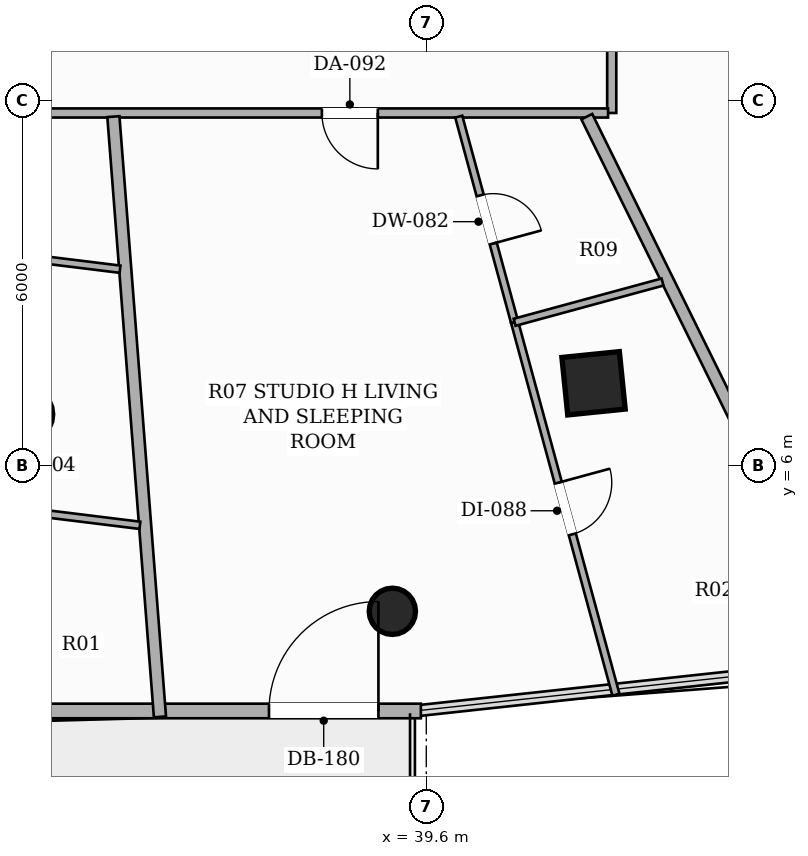
"""IFC4 building model, lengths in metres.
Left out: names, types, materials, properties, quantities, classifications, styles, units other than length and angle.
Written with IfcOpenShell. Run it as: python <this file> out.ifc"""

import sys

from ifc_helpers import new_model, si_unit, direction, frame, frame_2d, origin, origin_2d, place, context, subcontext, project, spatial, rectangle, hollow_rectangle, hollow_circle, extrude, element, fill, save


model = new_model("IFC4")
c1 = context("Model", 3, precision=1e-05, world=origin(), true_north=direction((0.0, 1.0)))
c2 = subcontext(c1, "Body", "Model", "MODEL_VIEW")
j1 = project(units=[si_unit("LENGTHUNIT", "METRE"), si_unit("PLANEANGLEUNIT", "RADIAN")], contexts=[c1])
p1 = place(None, origin())
s1 = spatial("IfcSite", under=j1, at=p1, CompositionType="ELEMENT")
p2 = place(p1, origin())
s2 = spatial("IfcBuilding", under=s1, at=p2, CompositionType="ELEMENT")
p3 = place(p2, frame((0.0, 0.0, 67.55)))
s3 = spatial("IfcBuildingStorey", under=s2, at=p3, CompositionType="ELEMENT", Elevation=67.55)
p4 = place(p3, frame((33.0, 6.844, 0.0), z_axis=(0.0, 0.0, 1.0), x_axis=(1.0, 0.0, 0.0)))
e1 = element("IfcColumn", 1, at=p4, inside=s3, PredefinedType="COLUMN", context=c2, shape_type="SweptSolid", body=[
    extrude(hollow_circle(Radius=0.457, WallThickness=0.025, at=origin_2d()), origin(), (0.0, 0.0, 1.0), 3.3),
])
p5 = place(p3, frame((42.351, 7.355, 0.0), z_axis=(0.0, 0.0, 1.0), x_axis=(0.994880708829, 0.101056297183, 0.0)))
e2 = element("IfcColumn", 2, at=p5, inside=s3, PredefinedType="COLUMN", context=c2, shape_type="SweptSolid", body=[
    extrude(hollow_rectangle(XDim=0.95, YDim=0.95, WallThickness=0.032, at=origin_2d()), origin(), (0.0, 0.0, 1.0), 3.3),
])
p6 = place(p3, frame((39.042, 3.605, 0.0), z_axis=(0.0, 0.0, 1.0), x_axis=(1.0, 0.0, 0.0)))
e3 = element("IfcColumn", 3, at=p6, inside=s3, PredefinedType="COLUMN", context=c2, shape_type="SweptSolid", body=[
    extrude(hollow_circle(Radius=0.381, WallThickness=0.022, at=origin_2d()), origin(), (0.0, 0.0, 1.0), 3.3),
])
p7 = place(p3, frame((26.489, 1.966, 0.0), z_axis=(0.0, 0.0, 1.0), x_axis=(1.0, 0.0, 0.0)))
e4 = element("IfcWall", 4, at=p7, inside=s3, PredefinedType="SOLIDWALL", context=c2, shape_type="SweptSolid", body=[
    extrude(rectangle(XDim=13.022, YDim=0.24, at=frame_2d((6.511, 0.0))), origin(), (0.0, 0.0, 1.0), 2.624),
])
p8 = place(p7, frame((10.524, 0.0, 0.0)))
e5 = element("IfcOpeningElement", 5, at=p8, cuts=e4, PredefinedType="OPENING", context=c2, shape_type="SweptSolid", body=[
    extrude(rectangle(XDim=1.8, YDim=2.2, at=frame_2d((0.9, 1.1))), frame((0.0, 0.13, 0.0), z_axis=(0.0, -1.0, 0.0), x_axis=(1.0, 0.0, 0.0)), (0.0, 0.0, 1.0), 0.26),
])
p9 = place(p3, frame((42.65, 36.84, 0.0), z_axis=(0.0, 0.0, 1.0), x_axis=(0.0, -1.0, 0.0)))
e6 = element("IfcWall", 6, at=p9, inside=s3, PredefinedType="PARTITIONING", context=c2, shape_type="SweptSolid", body=[
    extrude(rectangle(XDim=25.04, YDim=0.15, at=frame_2d((12.52, 0.0))), origin(), (0.0, 0.0, 1.0), 2.413),
])
p10 = place(p9, frame((6.577, 0.0, 0.0)))
e7 = element("IfcOpeningElement", 7, at=p10, cuts=e6, PredefinedType="OPENING", context=c2, shape_type="SweptSolid", body=[
    extrude(rectangle(XDim=0.92, YDim=2.15, at=frame_2d((0.46, 1.075))), frame((0.0, 0.085, 0.0), z_axis=(0.0, -1.0, 0.0), x_axis=(1.0, 0.0, 0.0)), (0.0, 0.0, 1.0), 0.17),
])
p11 = place(p9, frame((19.777, 0.0, 0.0)))
e8 = element("IfcOpeningElement", 8, at=p11, cuts=e6, PredefinedType="OPENING", context=c2, shape_type="SweptSolid", body=[
    extrude(rectangle(XDim=0.88, YDim=2.1, at=frame_2d((0.44, 1.05))), frame((0.0, 0.085, 0.0), z_axis=(0.0, -1.0, 0.0), x_axis=(1.0, 0.0, 0.0)), (0.0, 0.0, 1.0), 0.17),
])
p12 = place(p9, frame((14.193, 0.0, 0.0)))
e9 = element("IfcOpeningElement", 9, at=p12, cuts=e6, PredefinedType="OPENING", context=c2, shape_type="SweptSolid", body=[
    extrude(rectangle(XDim=0.88, YDim=2.1, at=frame_2d((0.44, 1.05))), frame((0.0, 0.085, 0.0), z_axis=(0.0, -1.0, 0.0), x_axis=(1.0, 0.0, 0.0)), (0.0, 0.0, 1.0), 0.17),
])
p13 = place(p3, frame((42.59, 11.8, 0.0), z_axis=(0.0, 0.0, 1.0), x_axis=(-1.0, 0.0, 0.0)))
e10 = element("IfcWall", 10, at=p13, inside=s3, PredefinedType="PARTITIONING", context=c2, shape_type="SweptSolid", body=[
    extrude(rectangle(XDim=19.24, YDim=0.15, at=frame_2d((9.62, 0.0))), origin(), (0.0, 0.0, 1.0), 2.669),
])
p14 = place(p13, frame((11.489, 0.0, 0.0)))
e11 = element("IfcOpeningElement", 11, at=p14, cuts=e10, PredefinedType="OPENING", context=c2, shape_type="SweptSolid", body=[
    extrude(rectangle(XDim=0.92, YDim=2.15, at=frame_2d((0.46, 1.075))), frame((0.0, 0.085, 0.0), z_axis=(0.0, -1.0, 0.0), x_axis=(1.0, 0.0, 0.0)), (0.0, 0.0, 1.0), 0.17),
])
p15 = place(p13, frame((3.787, 0.0, 0.0)))
e12 = element("IfcOpeningElement", 12, at=p15, cuts=e10, PredefinedType="OPENING", context=c2, shape_type="SweptSolid", body=[
    extrude(rectangle(XDim=0.92, YDim=2.15, at=frame_2d((0.46, 1.075))), frame((0.0, 0.085, 0.0), z_axis=(0.0, -1.0, 0.0), x_axis=(1.0, 0.0, 0.0)), (0.0, 0.0, 1.0), 0.17),
])
p16 = place(p3, frame((58.866, 12.141, 0.0), z_axis=(0.0, 0.0, 1.0), x_axis=(-0.815477500133, 0.578788775614, 0.0)))
e13 = element("IfcWall", 13, at=p16, inside=s3, PredefinedType="PARTITIONING", context=c2, shape_type="SweptSolid", body=[
    extrude(rectangle(XDim=19.812, YDim=0.2, at=frame_2d((9.906, 0.0))), origin(), (0.0, 0.0, 1.0), 2.413),
])
p17 = place(p3, frame((46.754, 2.576, 0.0), z_axis=(0.0, 0.0, 1.0), x_axis=(-0.441871352221, 0.897078429172, 0.0)))
e14 = element("IfcWall", 14, at=p17, inside=s3, PredefinedType="PARTITIONING", context=c2, shape_type="SweptSolid", body=[
    extrude(rectangle(XDim=10.215, YDim=0.2, at=frame_2d((5.108, 0.0))), origin(), (0.0, 0.0, 1.0), 2.413),
])
p18 = place(p3, frame((42.71, 21.087, 0.0), z_axis=(0.0, 0.0, 1.0), x_axis=(0.717996025824, -0.696047201633, 0.0)))
e15 = element("IfcWall", 15, at=p18, inside=s3, PredefinedType="PARTITIONING", context=c2, shape_type="SweptSolid", body=[
    extrude(rectangle(XDim=23.737, YDim=0.2, at=frame_2d((11.868, 0.0))), origin(), (0.0, 0.0, 1.0), 2.413),
])
p19 = place(p3, frame((34.454, 11.74, 0.0), z_axis=(0.0, 0.0, 1.0), x_axis=(0.077354581403, -0.997003645297, 0.0)))
e16 = element("IfcWall", 16, at=p19, inside=s3, PredefinedType="PARTITIONING", context=c2, shape_type="SweptSolid", body=[
    extrude(rectangle(XDim=9.901, YDim=0.2, at=frame_2d((4.95, 0.0))), origin(), (0.0, 0.0, 1.0), 2.413),
])
p20 = place(p3, frame((34.563, 9.231, 0.0), z_axis=(0.0, 0.0, 1.0), x_axis=(-0.992492062854, 0.122309055968, 0.0)))
e17 = element("IfcWall", 17, at=p20, inside=s3, PredefinedType="PARTITIONING", context=c2, shape_type="SweptSolid", body=[
    extrude(rectangle(XDim=2.02, YDim=0.12, at=frame_2d((1.01, 0.0))), origin(), (0.0, 0.0, 1.0), 2.669),
])
p21 = place(p3, frame((34.89, 5.019, 0.0), z_axis=(0.0, 0.0, 1.0), x_axis=(-0.992491734807, 0.12231171792, 0.0)))
e18 = element("IfcWall", 18, at=p21, inside=s3, PredefinedType="PARTITIONING", context=c2, shape_type="SweptSolid", body=[
    extrude(rectangle(XDim=2.86, YDim=0.12, at=frame_2d((1.43, 0.0))), origin(), (0.0, 0.0, 1.0), 3.06),
])
p22 = place(p3, frame((40.134, 11.74, 0.0), z_axis=(0.0, 0.0, 1.0), x_axis=(0.262203658207, -0.965012560345, 0.0)))
e19 = element("IfcWall", 19, at=p22, inside=s3, PredefinedType="PARTITIONING", context=c2, shape_type="SweptSolid", body=[
    extrude(rectangle(XDim=3.505, YDim=0.12, at=frame_2d((1.752, 0.0))), origin(), (0.0, 0.0, 1.0), 3.06),
])
p23 = place(p22, frame((1.342, 0.0, 0.0)))
e20 = element("IfcOpeningElement", 20, at=p23, cuts=e19, PredefinedType="OPENING", context=c2, shape_type="SweptSolid", body=[
    extrude(rectangle(XDim=0.82, YDim=2.1, at=frame_2d((0.41, 1.05))), frame((0.0, 0.07, 0.0), z_axis=(0.0, -1.0, 0.0), x_axis=(1.0, 0.0, 0.0)), (0.0, 0.0, 1.0), 0.14),
])
p24 = place(p3, frame((41.053, 8.358, 0.0), z_axis=(0.0, 0.0, 1.0), x_axis=(0.262466446164, -0.964941119778, 0.0)))
e21 = element("IfcWall", 21, at=p24, inside=s3, PredefinedType="PARTITIONING", context=c2, shape_type="SweptSolid", body=[
    extrude(rectangle(XDim=6.348, YDim=0.12, at=frame_2d((3.174, 0.0))), origin(), (0.0, 0.0, 1.0), 2.413),
])
p25 = place(p24, frame((2.734, 0.0, 0.0)))
e22 = element("IfcOpeningElement", 22, at=p25, cuts=e21, PredefinedType="OPENING", context=c2, shape_type="SweptSolid", body=[
    extrude(rectangle(XDim=0.88, YDim=2.1, at=frame_2d((0.44, 1.05))), frame((0.0, 0.07, 0.0), z_axis=(0.0, -1.0, 0.0), x_axis=(1.0, 0.0, 0.0)), (0.0, 0.0, 1.0), 0.14),
])
p26 = place(p3, frame((43.485, 9.02, 0.0), z_axis=(0.0, 0.0, 1.0), x_axis=(-0.964884417827, -0.262674818425, 0.0)))
e23 = element("IfcWall", 23, at=p26, inside=s3, PredefinedType="PARTITIONING", context=c2, shape_type="SweptSolid", body=[
    extrude(rectangle(XDim=2.521, YDim=0.12, at=frame_2d((1.26, 0.0))), origin(), (0.0, 0.0, 1.0), 2.669),
])
p27 = place(p8, origin())
e24 = element("IfcDoor", 24, at=p27, inside=s3, OperationType="SINGLE_SWING_RIGHT", PredefinedType="DOOR", context=c2, shape_type="SweptSolid", body=[
    extrude(rectangle(XDim=1.8, YDim=2.2, at=frame_2d((0.9, 1.1))), frame((0.0, 0.025, 0.0), z_axis=(0.0, -1.0, 0.0), x_axis=(1.0, 0.0, 0.0)), (0.0, 0.0, 1.0), 0.05),
])
fill(e5, e24)
p28 = place(p15, origin())
e25 = element("IfcDoor", 25, at=p28, inside=s3, OperationType="SINGLE_SWING_LEFT", PredefinedType="DOOR", context=c2, shape_type="SweptSolid", body=[
    extrude(rectangle(XDim=0.92, YDim=2.15, at=frame_2d((0.46, 1.075))), frame((0.0, 0.025, 0.0), z_axis=(0.0, -1.0, 0.0), x_axis=(1.0, 0.0, 0.0)), (0.0, 0.0, 1.0), 0.05),
])
fill(e12, e25)
p29 = place(p23, origin())
e26 = element("IfcDoor", 26, at=p29, inside=s3, OperationType="SINGLE_SWING_RIGHT", PredefinedType="DOOR", context=c2, shape_type="SweptSolid", body=[
    extrude(rectangle(XDim=0.82, YDim=2.1, at=frame_2d((0.41, 1.05))), frame((0.0, 0.025, 0.0), z_axis=(0.0, -1.0, 0.0), x_axis=(1.0, 0.0, 0.0)), (0.0, 0.0, 1.0), 0.05),
])
fill(e20, e26)
p30 = place(p25, origin())
e27 = element("IfcDoor", 27, at=p30, inside=s3, OperationType="SINGLE_SWING_LEFT", PredefinedType="DOOR", context=c2, shape_type="SweptSolid", body=[
    extrude(rectangle(XDim=0.88, YDim=2.1, at=frame_2d((0.44, 1.05))), frame((0.0, 0.025, 0.0), z_axis=(0.0, -1.0, 0.0), x_axis=(1.0, 0.0, 0.0)), (0.0, 0.0, 1.0), 0.05),
])
fill(e22, e27)
save(model, sys.argv[1])
